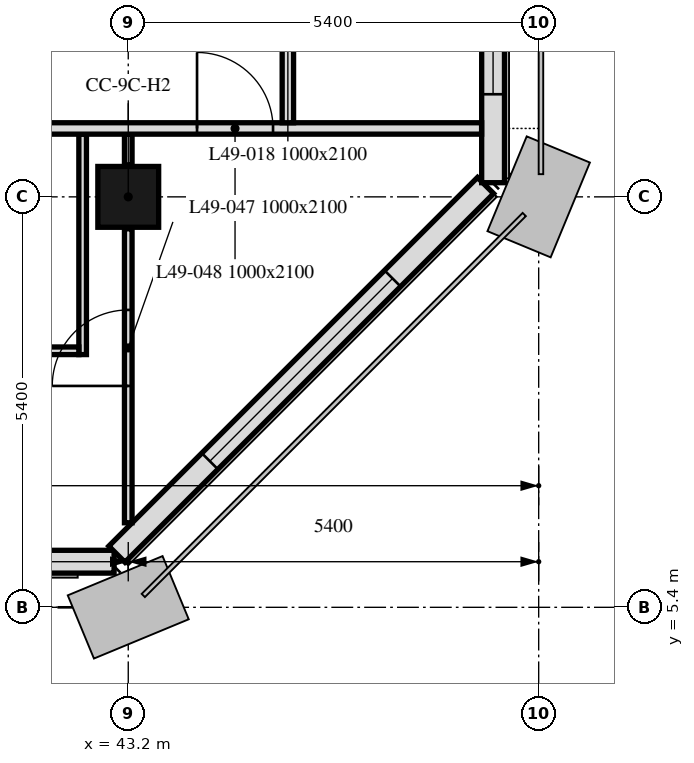
"""IFC4 building model, lengths in metres.
Left out: names, types, materials, properties, quantities, classifications, styles, units other than length and angle.
Written with IfcOpenShell. Run it as: python <this file> out.ifc"""

import sys

from ifc_helpers import new_model, si_unit, direction, frame, frame_2d, origin, origin_2d, place, context, subcontext, project, spatial, rectangle, extrude, element, fill, save


model = new_model("IFC4")
c1 = context("Model", 3, precision=1e-05, world=origin(), true_north=direction((0.0, 1.0)))
c2 = subcontext(c1, "Body", "Model", "MODEL_VIEW")
j1 = project(units=[si_unit("LENGTHUNIT", "METRE"), si_unit("PLANEANGLEUNIT", "RADIAN")], contexts=[c1])
p1 = place(None, origin())
s1 = spatial("IfcSite", under=j1, at=p1, CompositionType="ELEMENT")
p2 = place(p1, origin())
s2 = spatial("IfcBuilding", under=s1, at=p2, CompositionType="ELEMENT")
p3 = place(p2, frame((0.0, 0.0, 200.5)))
s3 = spatial("IfcBuildingStorey", under=s2, at=p3, CompositionType="ELEMENT", Elevation=200.5)
p4 = place(p3, frame((43.2, 10.8, 0.0), z_axis=(0.0, 0.0, 1.0), x_axis=(1.0, 0.0, 0.0)))
e1 = element("IfcColumn", 1, at=p4, inside=s3, PredefinedType="COLUMN", context=c2, shape_type="SweptSolid", body=[
    extrude(rectangle(XDim=0.8, YDim=0.8, at=origin_2d()), origin(), (0.0, 0.0, 1.0), 3.0),
])
p5 = place(p3, frame((10.986, 6.0, 0.0), z_axis=(0.0, 0.0, 1.0), x_axis=(1.0, 0.0, 0.0)))
e2 = element("IfcWall", 2, at=p5, inside=s3, PredefinedType="SOLIDWALL", context=c2, shape_type="SweptSolid", body=[
    extrude(rectangle(XDim=32.027, YDim=0.3, at=frame_2d((16.014, 0.0))), origin(), (0.0, 0.0, 1.0), 3.0),
])
p6 = place(p5, frame((0.814, 0.0, 0.9)))
e3 = element("IfcOpeningElement", 3, at=p6, cuts=e2, PredefinedType="OPENING", context=c2, shape_type="SweptSolid", body=[
    extrude(rectangle(XDim=3.4, YDim=1.7, at=frame_2d((1.7, 0.85))), frame((0.0, 0.16, 0.0), z_axis=(0.0, -1.0, 0.0), x_axis=(1.0, 0.0, 0.0)), (0.0, 0.0, 1.0), 0.32),
])
p7 = place(p5, frame((6.564, 0.0, 0.9)))
e4 = element("IfcOpeningElement", 4, at=p7, cuts=e2, PredefinedType="OPENING", context=c2, shape_type="SweptSolid", body=[
    extrude(rectangle(XDim=1.1, YDim=1.7, at=frame_2d((0.55, 0.85))), frame((0.0, 0.16, 0.0), z_axis=(0.0, -1.0, 0.0), x_axis=(1.0, 0.0, 0.0)), (0.0, 0.0, 1.0), 0.32),
])
p8 = place(p5, frame((11.614, 0.0, 0.9)))
e5 = element("IfcOpeningElement", 5, at=p8, cuts=e2, PredefinedType="OPENING", context=c2, shape_type="SweptSolid", body=[
    extrude(rectangle(XDim=3.4, YDim=1.7, at=frame_2d((1.7, 0.85))), frame((0.0, 0.16, 0.0), z_axis=(0.0, -1.0, 0.0), x_axis=(1.0, 0.0, 0.0)), (0.0, 0.0, 1.0), 0.32),
])
p9 = place(p5, frame((17.364, 0.0, 0.9)))
e6 = element("IfcOpeningElement", 6, at=p9, cuts=e2, PredefinedType="OPENING", context=c2, shape_type="SweptSolid", body=[
    extrude(rectangle(XDim=1.1, YDim=1.7, at=frame_2d((0.55, 0.85))), frame((0.0, 0.16, 0.0), z_axis=(0.0, -1.0, 0.0), x_axis=(1.0, 0.0, 0.0)), (0.0, 0.0, 1.0), 0.32),
])
p10 = place(p5, frame((22.414, 0.0, 0.9)))
e7 = element("IfcOpeningElement", 7, at=p10, cuts=e2, PredefinedType="OPENING", context=c2, shape_type="SweptSolid", body=[
    extrude(rectangle(XDim=3.4, YDim=1.7, at=frame_2d((1.7, 0.85))), frame((0.0, 0.16, 0.0), z_axis=(0.0, -1.0, 0.0), x_axis=(1.0, 0.0, 0.0)), (0.0, 0.0, 1.0), 0.32),
])
p11 = place(p5, frame((28.164, 0.0, 0.9)))
e8 = element("IfcOpeningElement", 8, at=p11, cuts=e2, PredefinedType="OPENING", context=c2, shape_type="SweptSolid", body=[
    extrude(rectangle(XDim=1.1, YDim=1.7, at=frame_2d((0.55, 0.85))), frame((0.0, 0.16, 0.0), z_axis=(0.0, -1.0, 0.0), x_axis=(1.0, 0.0, 0.0)), (0.0, 0.0, 1.0), 0.32),
])
p12 = place(p3, frame((43.051, 6.099, 0.0), z_axis=(0.0, 0.0, 1.0), x_axis=(0.707106781187, 0.707106781187, 0.0)))
e9 = element("IfcWall", 9, at=p12, inside=s3, PredefinedType="SOLIDWALL", context=c2, shape_type="SweptSolid", body=[
    extrude(rectangle(XDim=6.86, YDim=0.3, at=frame_2d((3.43, 0.0))), origin(), (0.0, 0.0, 1.0), 3.0),
])
p13 = place(p12, frame((1.73, 0.0, 0.9)))
e10 = element("IfcOpeningElement", 10, at=p13, cuts=e9, PredefinedType="OPENING", context=c2, shape_type="SweptSolid", body=[
    extrude(rectangle(XDim=3.4, YDim=1.7, at=frame_2d((1.7, 0.85))), frame((0.0, 0.16, 0.0), z_axis=(0.0, -1.0, 0.0), x_axis=(1.0, 0.0, 0.0)), (0.0, 0.0, 1.0), 0.32),
])
p14 = place(p3, frame((48.0, 10.986, 0.0), z_axis=(0.0, 0.0, 1.0), x_axis=(0.0, 1.0, 0.0)))
e11 = element("IfcWall", 11, at=p14, inside=s3, PredefinedType="SOLIDWALL", context=c2, shape_type="SweptSolid", body=[
    extrude(rectangle(XDim=32.027, YDim=0.3, at=frame_2d((16.014, 0.0))), origin(), (0.0, 0.0, 1.0), 3.0),
])
p15 = place(p14, frame((1.164, 0.0, 0.9)))
e12 = element("IfcOpeningElement", 12, at=p15, cuts=e11, PredefinedType="OPENING", context=c2, shape_type="SweptSolid", body=[
    extrude(rectangle(XDim=1.1, YDim=1.7, at=frame_2d((0.55, 0.85))), frame((0.0, 0.16, 0.0), z_axis=(0.0, -1.0, 0.0), x_axis=(1.0, 0.0, 0.0)), (0.0, 0.0, 1.0), 0.32),
])
p16 = place(p14, frame((2.764, 0.0, 0.9)))
e13 = element("IfcOpeningElement", 13, at=p16, cuts=e11, PredefinedType="OPENING", context=c2, shape_type="SweptSolid", body=[
    extrude(rectangle(XDim=1.1, YDim=1.7, at=frame_2d((0.55, 0.85))), frame((0.0, 0.16, 0.0), z_axis=(0.0, -1.0, 0.0), x_axis=(1.0, 0.0, 0.0)), (0.0, 0.0, 1.0), 0.32),
])
p17 = place(p14, frame((6.564, 0.0, 0.9)))
e14 = element("IfcOpeningElement", 14, at=p17, cuts=e11, PredefinedType="OPENING", context=c2, shape_type="SweptSolid", body=[
    extrude(rectangle(XDim=1.1, YDim=1.7, at=frame_2d((0.55, 0.85))), frame((0.0, 0.16, 0.0), z_axis=(0.0, -1.0, 0.0), x_axis=(1.0, 0.0, 0.0)), (0.0, 0.0, 1.0), 0.32),
])
p18 = place(p14, frame((8.164, 0.0, 0.9)))
e15 = element("IfcOpeningElement", 15, at=p18, cuts=e11, PredefinedType="OPENING", context=c2, shape_type="SweptSolid", body=[
    extrude(rectangle(XDim=1.1, YDim=1.7, at=frame_2d((0.55, 0.85))), frame((0.0, 0.16, 0.0), z_axis=(0.0, -1.0, 0.0), x_axis=(1.0, 0.0, 0.0)), (0.0, 0.0, 1.0), 0.32),
])
p19 = place(p14, frame((11.964, 0.0, 0.9)))
e16 = element("IfcOpeningElement", 16, at=p19, cuts=e11, PredefinedType="OPENING", context=c2, shape_type="SweptSolid", body=[
    extrude(rectangle(XDim=1.1, YDim=1.7, at=frame_2d((0.55, 0.85))), frame((0.0, 0.16, 0.0), z_axis=(0.0, -1.0, 0.0), x_axis=(1.0, 0.0, 0.0)), (0.0, 0.0, 1.0), 0.32),
])
p20 = place(p14, frame((13.564, 0.0, 0.9)))
e17 = element("IfcOpeningElement", 17, at=p20, cuts=e11, PredefinedType="OPENING", context=c2, shape_type="SweptSolid", body=[
    extrude(rectangle(XDim=1.1, YDim=1.7, at=frame_2d((0.55, 0.85))), frame((0.0, 0.16, 0.0), z_axis=(0.0, -1.0, 0.0), x_axis=(1.0, 0.0, 0.0)), (0.0, 0.0, 1.0), 0.32),
])
p21 = place(p14, frame((17.364, 0.0, 0.9)))
e18 = element("IfcOpeningElement", 18, at=p21, cuts=e11, PredefinedType="OPENING", context=c2, shape_type="SweptSolid", body=[
    extrude(rectangle(XDim=1.1, YDim=1.7, at=frame_2d((0.55, 0.85))), frame((0.0, 0.16, 0.0), z_axis=(0.0, -1.0, 0.0), x_axis=(1.0, 0.0, 0.0)), (0.0, 0.0, 1.0), 0.32),
])
p22 = place(p14, frame((18.964, 0.0, 0.9)))
e19 = element("IfcOpeningElement", 19, at=p22, cuts=e11, PredefinedType="OPENING", context=c2, shape_type="SweptSolid", body=[
    extrude(rectangle(XDim=1.1, YDim=1.7, at=frame_2d((0.55, 0.85))), frame((0.0, 0.16, 0.0), z_axis=(0.0, -1.0, 0.0), x_axis=(1.0, 0.0, 0.0)), (0.0, 0.0, 1.0), 0.32),
])
p23 = place(p14, frame((22.414, 0.0, 0.9)))
e20 = element("IfcOpeningElement", 20, at=p23, cuts=e11, PredefinedType="OPENING", context=c2, shape_type="SweptSolid", body=[
    extrude(rectangle(XDim=3.4, YDim=1.7, at=frame_2d((1.7, 0.85))), frame((0.0, 0.16, 0.0), z_axis=(0.0, -1.0, 0.0), x_axis=(1.0, 0.0, 0.0)), (0.0, 0.0, 1.0), 0.32),
])
p24 = place(p14, frame((28.789, 0.0, 0.9)))
e21 = element("IfcOpeningElement", 21, at=p24, cuts=e11, PredefinedType="OPENING", context=c2, shape_type="SweptSolid", body=[
    extrude(rectangle(XDim=0.65, YDim=1.7, at=frame_2d((0.325, 0.85))), frame((0.0, 0.16, 0.0), z_axis=(0.0, -1.0, 0.0), x_axis=(1.0, 0.0, 0.0)), (0.0, 0.0, 1.0), 0.32),
])
p25 = place(p14, frame((29.764, 0.0, 0.9)))
e22 = element("IfcOpeningElement", 22, at=p25, cuts=e11, PredefinedType="OPENING", context=c2, shape_type="SweptSolid", body=[
    extrude(rectangle(XDim=1.1, YDim=1.7, at=frame_2d((0.55, 0.85))), frame((0.0, 0.16, 0.0), z_axis=(0.0, -1.0, 0.0), x_axis=(1.0, 0.0, 0.0)), (0.0, 0.0, 1.0), 0.32),
])
p26 = place(p3, frame((43.2, 6.512, 0.0), z_axis=(0.0, 0.0, 1.0), x_axis=(0.0, 1.0, 0.0)))
e23 = element("IfcWall", 23, at=p26, inside=s3, PredefinedType="PARTITIONING", context=c2, shape_type="SweptSolid", body=[
    extrude(rectangle(XDim=3.868, YDim=0.1, at=frame_2d((1.934, 0.0))), origin(), (0.0, 0.0, 1.0), 3.0),
])
p27 = place(p26, frame((1.8, 0.0, 0.0)))
e24 = element("IfcOpeningElement", 24, at=p27, cuts=e23, PredefinedType="OPENING", context=c2, shape_type="SweptSolid", body=[
    extrude(rectangle(XDim=1.0, YDim=2.1, at=frame_2d((0.5, 1.05))), frame((0.0, 0.05, 0.0), z_axis=(0.0, -1.0, 0.0), x_axis=(1.0, 0.0, 0.0)), (0.0, 0.0, 1.0), 0.1),
])
p28 = place(p3, frame((43.2, 11.22, 0.0), z_axis=(0.0, 0.0, 1.0), x_axis=(0.0, 1.0, 0.0)))
e25 = element("IfcWall", 25, at=p28, inside=s3, PredefinedType="PARTITIONING", context=c2, shape_type="SweptSolid", body=[
    extrude(rectangle(XDim=0.405, YDim=0.1, at=frame_2d((0.203, 0.0))), origin(), (0.0, 0.0, 1.0), 3.0),
])
p29 = place(p3, frame((42.6, 11.625, 0.0), z_axis=(0.0, 0.0, 1.0), x_axis=(0.0, -1.0, 0.0)))
e26 = element("IfcWall", 26, at=p29, inside=s3, PredefinedType="PARTITIONING", context=c2, shape_type="SweptSolid", body=[
    extrude(rectangle(XDim=2.9, YDim=0.1, at=frame_2d((1.45, 0.0))), origin(), (0.0, 0.0, 1.0), 3.0),
])
p30 = place(p3, frame((42.55, 8.775, 0.0), z_axis=(0.0, 0.0, 1.0), x_axis=(-1.0, 0.0, 0.0)))
e27 = element("IfcWall", 27, at=p30, inside=s3, PredefinedType="PARTITIONING", context=c2, shape_type="SweptSolid", body=[
    extrude(rectangle(XDim=2.4, YDim=0.1, at=frame_2d((1.2, 0.0))), origin(), (0.0, 0.0, 1.0), 3.0),
])
p31 = place(p3, frame((6.151, 11.7, 0.0), z_axis=(0.0, 0.0, 1.0), x_axis=(1.0, 0.0, 0.0)))
e28 = element("IfcWall", 28, at=p31, inside=s3, PredefinedType="PARTITIONING", context=c2, shape_type="SweptSolid", body=[
    extrude(rectangle(XDim=41.698, YDim=0.15, at=frame_2d((20.849, 0.0))), origin(), (0.0, 0.0, 1.0), 3.0),
])
p32 = place(p31, frame((37.954, 0.0, 0.0)))
e29 = element("IfcOpeningElement", 29, at=p32, cuts=e28, PredefinedType="OPENING", context=c2, shape_type="SweptSolid", body=[
    extrude(rectangle(XDim=1.0, YDim=2.1, at=frame_2d((0.5, 1.05))), frame((0.0, 0.075, 0.0), z_axis=(0.0, -1.0, 0.0), x_axis=(1.0, 0.0, 0.0)), (0.0, 0.0, 1.0), 0.15),
])
p33 = place(p31, frame((6.849, 0.0, 0.0)))
e30 = element("IfcOpeningElement", 30, at=p33, cuts=e28, PredefinedType="OPENING", context=c2, shape_type="SweptSolid", body=[
    extrude(rectangle(XDim=1.0, YDim=2.1, at=frame_2d((0.5, 1.05))), frame((0.0, 0.075, 0.0), z_axis=(0.0, -1.0, 0.0), x_axis=(1.0, 0.0, 0.0)), (0.0, 0.0, 1.0), 0.15),
])
p34 = place(p31, frame((23.049, 0.0, 0.0)))
e31 = element("IfcOpeningElement", 31, at=p34, cuts=e28, PredefinedType="OPENING", context=c2, shape_type="SweptSolid", body=[
    extrude(rectangle(XDim=1.0, YDim=2.1, at=frame_2d((0.5, 1.05))), frame((0.0, 0.075, 0.0), z_axis=(0.0, -1.0, 0.0), x_axis=(1.0, 0.0, 0.0)), (0.0, 0.0, 1.0), 0.15),
])
p35 = place(p3, frame((45.3, 42.225, 0.0), z_axis=(0.0, 0.0, 1.0), x_axis=(0.0, -1.0, 0.0)))
e32 = element("IfcWall", 32, at=p35, inside=s3, PredefinedType="PARTITIONING", context=c2, shape_type="SweptSolid", body=[
    extrude(rectangle(XDim=30.45, YDim=0.15, at=frame_2d((15.225, 0.0))), origin(), (0.0, 0.0, 1.0), 2.4),
])
p36 = place(p35, frame((12.025, 0.0, 0.0)))
e33 = element("IfcOpeningElement", 33, at=p36, cuts=e32, PredefinedType="OPENING", context=c2, shape_type="SweptSolid", body=[
    extrude(rectangle(XDim=1.0, YDim=2.1, at=frame_2d((0.5, 1.05))), frame((0.0, 0.075, 0.0), z_axis=(0.0, -1.0, 0.0), x_axis=(1.0, 0.0, 0.0)), (0.0, 0.0, 1.0), 0.15),
])
p37 = place(p35, frame((27.775, 0.0, 0.0)))
e34 = element("IfcOpeningElement", 34, at=p37, cuts=e32, PredefinedType="OPENING", context=c2, shape_type="SweptSolid", body=[
    extrude(rectangle(XDim=1.0, YDim=2.1, at=frame_2d((0.5, 1.05))), frame((0.0, 0.075, 0.0), z_axis=(0.0, -1.0, 0.0), x_axis=(1.0, 0.0, 0.0)), (0.0, 0.0, 1.0), 0.15),
])
p38 = place(p35, frame((6.192, 0.0, 0.0)))
e35 = element("IfcOpeningElement", 35, at=p38, cuts=e32, PredefinedType="OPENING", context=c2, shape_type="SweptSolid", body=[
    extrude(rectangle(XDim=1.0, YDim=2.1, at=frame_2d((0.5, 1.05))), frame((0.0, 0.075, 0.0), z_axis=(0.0, -1.0, 0.0), x_axis=(1.0, 0.0, 0.0)), (0.0, 0.0, 1.0), 0.15),
])
p39 = place(p35, frame((21.475, 0.0, 0.0)))
e36 = element("IfcOpeningElement", 36, at=p39, cuts=e32, PredefinedType="OPENING", context=c2, shape_type="SweptSolid", body=[
    extrude(rectangle(XDim=1.0, YDim=2.1, at=frame_2d((0.5, 1.05))), frame((0.0, 0.075, 0.0), z_axis=(0.0, -1.0, 0.0), x_axis=(1.0, 0.0, 0.0)), (0.0, 0.0, 1.0), 0.15),
])
p40 = place(p13, origin())
e37 = element("IfcWindow", 37, at=p40, inside=s3, PartitioningType="SINGLE_PANEL", PredefinedType="WINDOW", context=c2, shape_type="SweptSolid", body=[
    extrude(rectangle(XDim=3.4, YDim=1.7, at=frame_2d((1.7, 0.85))), frame((0.0, 0.03, 0.0), z_axis=(0.0, -1.0, 0.0), x_axis=(1.0, 0.0, 0.0)), (0.0, 0.0, 1.0), 0.06),
])
fill(e10, e37)
p41 = place(p15, origin())
e38 = element("IfcWindow", 38, at=p41, inside=s3, PartitioningType="SINGLE_PANEL", PredefinedType="WINDOW", context=c2, shape_type="SweptSolid", body=[
    extrude(rectangle(XDim=1.1, YDim=1.7, at=frame_2d((0.55, 0.85))), frame((0.0, 0.03, 0.0), z_axis=(0.0, -1.0, 0.0), x_axis=(1.0, 0.0, 0.0)), (0.0, 0.0, 1.0), 0.06),
])
fill(e12, e38)
p42 = place(p27, origin())
e39 = element("IfcDoor", 39, at=p42, inside=s3, OperationType="SINGLE_SWING_RIGHT", PredefinedType="DOOR", context=c2, shape_type="SweptSolid", body=[
    extrude(rectangle(XDim=1.0, YDim=2.1, at=frame_2d((0.5, 1.05))), frame((0.0, 0.025, 0.0), z_axis=(0.0, -1.0, 0.0), x_axis=(1.0, 0.0, 0.0)), (0.0, 0.0, 1.0), 0.05),
])
fill(e24, e39)
p43 = place(p32, origin())
e40 = element("IfcDoor", 40, at=p43, inside=s3, OperationType="SINGLE_SWING_LEFT", PredefinedType="DOOR", context=c2, shape_type="SweptSolid", body=[
    extrude(rectangle(XDim=1.0, YDim=2.1, at=frame_2d((0.5, 1.05))), frame((0.0, 0.025, 0.0), z_axis=(0.0, -1.0, 0.0), x_axis=(1.0, 0.0, 0.0)), (0.0, 0.0, 1.0), 0.05),
])
fill(e29, e40)
save(model, sys.argv[1])
